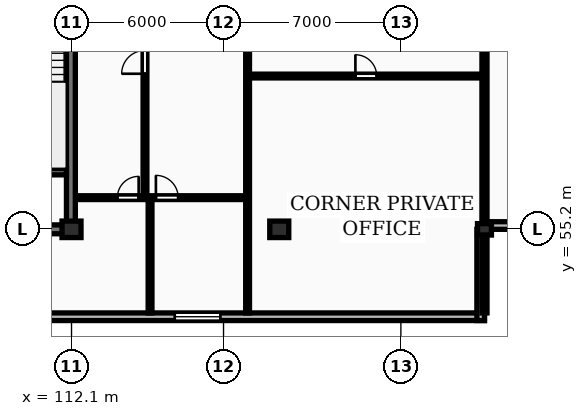
"""IFC4 building model, lengths in metres.
Left out: names, types, materials, properties, quantities, classifications, styles, units other than length and angle.
Written with IfcOpenShell. Run it as: python <this file> out.ifc"""

import sys

from ifc_helpers import new_model, si_unit, direction, frame, frame_2d, origin, origin_2d, place, context, subcontext, project, spatial, rectangle, extrude, element, fill, save


model = new_model("IFC4")
c1 = context("Model", 3, precision=1e-05, world=origin(), true_north=direction((0.0, 1.0)))
c2 = subcontext(c1, "Body", "Model", "MODEL_VIEW")
j1 = project(units=[si_unit("LENGTHUNIT", "METRE"), si_unit("PLANEANGLEUNIT", "RADIAN")], contexts=[c1])
p1 = place(None, origin())
s1 = spatial("IfcSite", under=j1, at=p1, CompositionType="ELEMENT")
p2 = place(p1, origin())
s2 = spatial("IfcBuilding", under=s1, at=p2, CompositionType="ELEMENT")
p3 = place(p2, frame((0.0, 0.0, 228.65)))
s3 = spatial("IfcBuildingStorey", under=s2, at=p3, CompositionType="ELEMENT", Elevation=228.65)
for number, where, z_axis, x_axis in (
    (1, (112.1, 55.2, 0.0), (0.0, 0.0, 1.0), (1.0, 0.0, 0.0)),
    (2, (120.3, 55.2, 0.0), (0.0, 0.0, 1.0), (1.0, 0.0, 0.0)),
):
    element("IfcColumn", number, at=place(p3, frame(where, z_axis=z_axis, x_axis=x_axis)), inside=s3, PredefinedType="COLUMN", context=c2, shape_type="SweptSolid", body=[
        extrude(rectangle(XDim=0.75, YDim=0.65, at=origin_2d()), origin(), (0.0, 0.0, 1.0), 3.45),
    ])
p4 = place(p3, frame((128.4, 55.2, 0.0), z_axis=(0.0, 0.0, 1.0), x_axis=(1.0, 0.0, 0.0)))
e3 = element("IfcColumn", 3, at=p4, inside=s3, PredefinedType="PILASTER", context=c2, shape_type="SweptSolid", body=[
    extrude(rectangle(XDim=0.55, YDim=0.45, at=origin_2d()), origin(), (0.0, 0.0, 1.0), 3.45),
])
p5 = place(p3, frame((59.8, 51.75, 0.0), z_axis=(0.0, 0.0, 1.0), x_axis=(1.0, 0.0, 0.0)))
e4 = element("IfcWall", 4, at=p5, inside=s3, PredefinedType="STANDARD", context=c2, shape_type="SweptSolid", body=[
    extrude(rectangle(XDim=68.6, YDim=0.3, at=frame_2d((34.3, 0.0))), origin(), (0.0, 0.0, 1.0), 3.17),
])
p6 = place(p5, frame((13.025, 0.0, 0.85)))
e5 = element("IfcOpeningElement", 5, at=p6, cuts=e4, PredefinedType="OPENING", context=c2, shape_type="SweptSolid", body=[
    extrude(rectangle(XDim=1.8, YDim=1.8, at=frame_2d((0.9, 0.9))), frame((0.0, 0.16, 0.0), z_axis=(0.0, -1.0, 0.0), x_axis=(1.0, 0.0, 0.0)), (0.0, 0.0, 1.0), 0.32),
])
p7 = place(p5, frame((56.375, 0.0, 0.85)))
e6 = element("IfcOpeningElement", 6, at=p7, cuts=e4, PredefinedType="OPENING", context=c2, shape_type="SweptSolid", body=[
    extrude(rectangle(XDim=1.8, YDim=1.8, at=frame_2d((0.9, 0.9))), frame((0.0, 0.16, 0.0), z_axis=(0.0, -1.0, 0.0), x_axis=(1.0, 0.0, 0.0)), (0.0, 0.0, 1.0), 0.32),
])
p8 = place(p3, frame((128.25, 51.6, 0.0), z_axis=(0.0, 0.0, 1.0), x_axis=(0.0, 1.0, 0.0)))
e7 = element("IfcWall", 7, at=p8, inside=s3, PredefinedType="STANDARD", context=c2, shape_type="SweptSolid", body=[
    extrude(rectangle(XDim=3.6, YDim=0.3, at=frame_2d((1.8, 0.0))), origin(), (0.0, 0.0, 1.0), 3.17),
])
p9 = place(p3, frame((128.4, 55.35, 0.0), z_axis=(0.0, 0.0, 1.0), x_axis=(1.0, 0.0, 0.0)))
e8 = element("IfcWall", 8, at=p9, inside=s3, PredefinedType="STANDARD", context=c2, shape_type="SweptSolid", body=[
    extrude(rectangle(XDim=3.6, YDim=0.3, at=frame_2d((1.8, 0.0))), origin(), (0.0, 0.0, 1.0), 3.17),
])
p10 = place(p3, frame((75.95, 55.2, 0.0), z_axis=(0.0, 0.0, 1.0), x_axis=(1.0, 0.0, 0.0)))
e9 = element("IfcWall", 9, at=p10, inside=s3, PredefinedType="SHEAR", context=c2, shape_type="SweptSolid", body=[
    extrude(rectangle(XDim=36.3, YDim=0.35, at=frame_2d((18.15, 0.0))), origin(), (0.0, 0.0, 1.0), 3.45),
])
p11 = place(p3, frame((112.075, 55.375, 0.0), z_axis=(0.0, 0.0, 1.0), x_axis=(0.0, 1.0, 0.0)))
e10 = element("IfcWall", 10, at=p11, inside=s3, PredefinedType="SHEAR", context=c2, shape_type="SweptSolid", body=[
    extrude(rectangle(XDim=11.65, YDim=0.35, at=frame_2d((5.825, 0.0))), origin(), (0.0, 0.0, 1.0), 3.45),
])
p12 = place(p3, frame((108.66, 57.475, 0.0), z_axis=(0.0, 0.0, 1.0), x_axis=(1.0, 0.0, 0.0)))
e11 = element("IfcWall", 11, at=p12, inside=s3, PredefinedType="SHEAR", context=c2, shape_type="SweptSolid", body=[
    extrude(rectangle(XDim=3.24, YDim=0.25, at=frame_2d((1.62, 0.0))), origin(), (0.0, 0.0, 1.0), 3.45),
])
p13 = place(p3, frame((128.4, 51.9, 0.0), z_axis=(0.0, 0.0, 1.0), x_axis=(0.0, 1.0, 0.0)))
e12 = element("IfcWall", 12, at=p13, inside=s3, PredefinedType="PARTITIONING", context=c2, shape_type="SweptSolid", body=[
    extrude(rectangle(XDim=15.3, YDim=0.2, at=frame_2d((7.65, 0.0))), origin(), (0.0, 0.0, 1.0), 2.477),
])
p14 = place(p3, frame((119.05, 61.25, 0.0), z_axis=(0.0, 0.0, 1.0), x_axis=(1.0, 0.0, 0.0)))
e13 = element("IfcWall", 13, at=p14, inside=s3, PredefinedType="PARTITIONING", context=c2, shape_type="SweptSolid", body=[
    extrude(rectangle(XDim=9.35, YDim=0.15, at=frame_2d((4.675, 0.0))), origin(), (0.0, 0.0, 1.0), 3.17),
])
p15 = place(p14, frame((4.255, 0.0, 0.0)))
e14 = element("IfcOpeningElement", 14, at=p15, cuts=e13, PredefinedType="OPENING", context=c2, shape_type="SweptSolid", body=[
    extrude(rectangle(XDim=0.84, YDim=2.04, at=frame_2d((0.42, 1.02))), frame((0.0, 0.085, 0.0), z_axis=(0.0, -1.0, 0.0), x_axis=(1.0, 0.0, 0.0)), (0.0, 0.0, 1.0), 0.17),
])
p16 = place(p3, frame((119.05, 51.9, 0.0), z_axis=(0.0, 0.0, 1.0), x_axis=(0.0, 1.0, 0.0)))
e15 = element("IfcWall", 15, at=p16, inside=s3, PredefinedType="PARTITIONING", context=c2, shape_type="SweptSolid", body=[
    extrude(rectangle(XDim=15.25, YDim=0.15, at=frame_2d((7.625, 0.0))), origin(), (0.0, 0.0, 1.0), 3.17),
])
p17 = place(p16, frame((10.5, 0.0, 0.0)))
e16 = element("IfcOpeningElement", 16, at=p17, cuts=e15, PredefinedType="OPENING", context=c2, shape_type="SweptSolid", body=[
    extrude(rectangle(XDim=0.88, YDim=2.06, at=frame_2d((0.44, 1.03))), frame((0.0, 0.085, 0.0), z_axis=(0.0, -1.0, 0.0), x_axis=(1.0, 0.0, 0.0)), (0.0, 0.0, 1.0), 0.17),
])
p18 = place(p3, frame((115.0, 56.45, 0.0), z_axis=(0.0, 0.0, 1.0), x_axis=(0.0, 1.0, 0.0)))
e17 = element("IfcWall", 17, at=p18, inside=s3, PredefinedType="PARTITIONING", context=c2, shape_type="SweptSolid", body=[
    extrude(rectangle(XDim=10.7, YDim=0.15, at=frame_2d((5.35, 0.0))), origin(), (0.0, 0.0, 1.0), 3.17),
])
p19 = place(p18, frame((4.89, 0.0, 0.0)))
e18 = element("IfcOpeningElement", 18, at=p19, cuts=e17, PredefinedType="OPENING", context=c2, shape_type="SweptSolid", body=[
    extrude(rectangle(XDim=0.92, YDim=2.08, at=frame_2d((0.46, 1.04))), frame((0.0, 0.085, 0.0), z_axis=(0.0, -1.0, 0.0), x_axis=(1.0, 0.0, 0.0)), (0.0, 0.0, 1.0), 0.17),
])
p20 = place(p3, frame((115.2, 51.9, 0.0), z_axis=(0.0, 0.0, 1.0), x_axis=(0.0, 1.0, 0.0)))
e19 = element("IfcWall", 19, at=p20, inside=s3, PredefinedType="PARTITIONING", context=c2, shape_type="SweptSolid", body=[
    extrude(rectangle(XDim=4.55, YDim=0.15, at=frame_2d((2.275, 0.0))), origin(), (0.0, 0.0, 1.0), 3.17),
])
p21 = place(p3, frame((112.27, 56.45, 0.0), z_axis=(0.0, 0.0, 1.0), x_axis=(1.0, 0.0, 0.0)))
e20 = element("IfcWall", 20, at=p21, inside=s3, PredefinedType="PARTITIONING", context=c2, shape_type="SweptSolid", body=[
    extrude(rectangle(XDim=6.76, YDim=0.15, at=frame_2d((3.38, 0.0))), origin(), (0.0, 0.0, 1.0), 3.17),
])
p22 = place(p21, frame((1.64, 0.0, 0.0)))
e21 = element("IfcOpeningElement", 21, at=p22, cuts=e20, PredefinedType="OPENING", context=c2, shape_type="SweptSolid", body=[
    extrude(rectangle(XDim=0.84, YDim=2.04, at=frame_2d((0.42, 1.02))), frame((0.0, 0.085, 0.0), z_axis=(0.0, -1.0, 0.0), x_axis=(1.0, 0.0, 0.0)), (0.0, 0.0, 1.0), 0.17),
])
p23 = place(p21, frame((3.16, 0.0, 0.0)))
e22 = element("IfcOpeningElement", 22, at=p23, cuts=e20, PredefinedType="OPENING", context=c2, shape_type="SweptSolid", body=[
    extrude(rectangle(XDim=0.88, YDim=2.06, at=frame_2d((0.44, 1.03))), frame((0.0, 0.085, 0.0), z_axis=(0.0, -1.0, 0.0), x_axis=(1.0, 0.0, 0.0)), (0.0, 0.0, 1.0), 0.17),
])
p24 = place(p7, origin())
e23 = element("IfcWindow", 23, at=p24, inside=s3, PartitioningType="SINGLE_PANEL", PredefinedType="WINDOW", context=c2, shape_type="SweptSolid", body=[
    extrude(rectangle(XDim=1.8, YDim=1.8, at=frame_2d((0.9, 0.9))), frame((0.0, 0.03, 0.0), z_axis=(0.0, -1.0, 0.0), x_axis=(1.0, 0.0, 0.0)), (0.0, 0.0, 1.0), 0.06),
])
fill(e6, e23)
p25 = place(p15, origin())
e24 = element("IfcDoor", 24, at=p25, inside=s3, OperationType="SINGLE_SWING_LEFT", PredefinedType="DOOR", context=c2, shape_type="SweptSolid", body=[
    extrude(rectangle(XDim=0.84, YDim=2.04, at=frame_2d((0.42, 1.02))), frame((0.0, 0.025, 0.0), z_axis=(0.0, -1.0, 0.0), x_axis=(1.0, 0.0, 0.0)), (0.0, 0.0, 1.0), 0.05),
])
fill(e14, e24)
p26 = place(p19, origin())
e25 = element("IfcDoor", 25, at=p26, inside=s3, OperationType="SINGLE_SWING_LEFT", PredefinedType="DOOR", context=c2, shape_type="SweptSolid", body=[
    extrude(rectangle(XDim=0.92, YDim=2.08, at=frame_2d((0.46, 1.04))), frame((0.0, 0.025, 0.0), z_axis=(0.0, -1.0, 0.0), x_axis=(1.0, 0.0, 0.0)), (0.0, 0.0, 1.0), 0.05),
])
fill(e18, e25)
p27 = place(p22, origin())
e26 = element("IfcDoor", 26, at=p27, inside=s3, OperationType="SINGLE_SWING_RIGHT", PredefinedType="DOOR", context=c2, shape_type="SweptSolid", body=[
    extrude(rectangle(XDim=0.84, YDim=2.04, at=frame_2d((0.42, 1.02))), frame((0.0, 0.025, 0.0), z_axis=(0.0, -1.0, 0.0), x_axis=(1.0, 0.0, 0.0)), (0.0, 0.0, 1.0), 0.05),
])
fill(e21, e26)
p28 = place(p23, origin())
e27 = element("IfcDoor", 27, at=p28, inside=s3, OperationType="SINGLE_SWING_LEFT", PredefinedType="DOOR", context=c2, shape_type="SweptSolid", body=[
    extrude(rectangle(XDim=0.88, YDim=2.06, at=frame_2d((0.44, 1.03))), frame((0.0, 0.025, 0.0), z_axis=(0.0, -1.0, 0.0), x_axis=(1.0, 0.0, 0.0)), (0.0, 0.0, 1.0), 0.05),
])
fill(e22, e27)
save(model, sys.argv[1])
